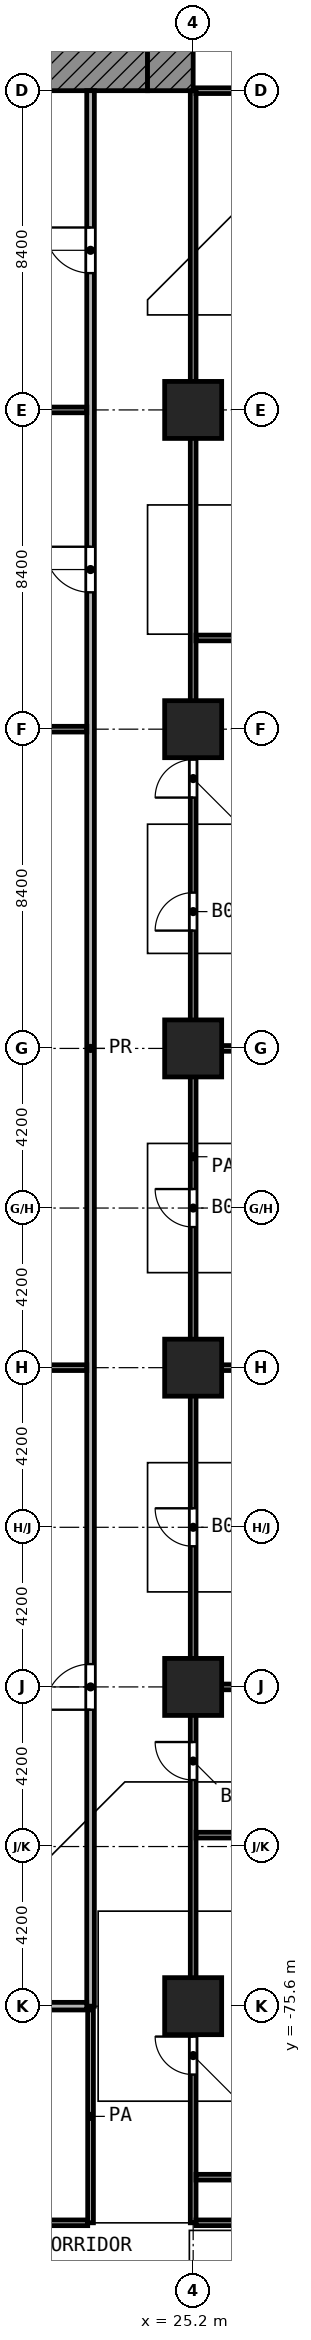
"""IFC4 building model, lengths in metres.
Left out: names, types, materials, properties, quantities, classifications, styles, units other than length and angle.
Written with IfcOpenShell. Run it as: python <this file> out.ifc"""

import sys

from ifc_helpers import new_model, si_unit, direction, frame, frame_2d, origin, origin_2d, place, context, subcontext, project, spatial, rectangle, extrude, element, fill, save


model = new_model("IFC4")
c1 = context("Model", 3, precision=1e-05, world=origin(), true_north=direction((0.0, 1.0)))
c2 = subcontext(c1, "Body", "Model", "MODEL_VIEW")
j1 = project(units=[si_unit("LENGTHUNIT", "METRE"), si_unit("PLANEANGLEUNIT", "RADIAN")], contexts=[c1])
p1 = place(None, origin())
s1 = spatial("IfcSite", under=j1, at=p1, CompositionType="ELEMENT")
p2 = place(p1, origin())
s2 = spatial("IfcBuilding", under=s1, at=p2, CompositionType="ELEMENT")
p3 = place(p2, frame((0.0, 0.0, -6.0)))
s3 = spatial("IfcBuildingStorey", under=s2, at=p3, CompositionType="ELEMENT", Elevation=-6.0)
for number, where, z_axis, x_axis in (
    (1, (25.2, -33.6, 0.0), (0.0, 0.0, 1.0), (1.0, 0.0, 0.0)),
    (2, (25.2, -42.0, 0.0), (0.0, 0.0, 1.0), (1.0, 0.0, 0.0)),
    (3, (25.2, -50.4, 0.0), (0.0, 0.0, 1.0), (1.0, 0.0, 0.0)),
    (4, (25.2, -58.8, 0.0), (0.0, 0.0, 1.0), (1.0, 0.0, 0.0)),
    (5, (25.2, -67.2, 0.0), (0.0, 0.0, 1.0), (1.0, 0.0, 0.0)),
    (6, (25.2, -75.6, 0.0), (0.0, 0.0, 1.0), (1.0, 0.0, 0.0)),
):
    element("IfcColumn", number, at=place(p3, frame(where, z_axis=z_axis, x_axis=x_axis)), inside=s3, PredefinedType="COLUMN", context=c2, shape_type="SweptSolid", body=[
        extrude(rectangle(XDim=1.5, YDim=1.5, at=origin_2d()), origin(), (0.0, 0.0, 1.0), 6.0),
    ])
p4 = place(p3, frame((5.4, -24.6, 0.0), z_axis=(0.0, 0.0, 1.0), x_axis=(1.0, 0.0, 0.0)))
e7 = element("IfcWall", 7, at=p4, inside=s3, PredefinedType="SHEAR", context=c2, shape_type="SweptSolid", body=[
    extrude(rectangle(XDim=18.6, YDim=1.2, at=frame_2d((9.3, 0.0))), origin(), (0.0, 0.0, 1.0), 5.55),
])
p5 = place(p4, frame((6.3, 0.0, 0.0)))
e8 = element("IfcOpeningElement", 8, at=p5, cuts=e7, PredefinedType="OPENING", context=c2, shape_type="SweptSolid", body=[
    extrude(rectangle(XDim=1.8, YDim=2.1, at=frame_2d((0.9, 1.05))), frame((0.0, 0.61, 0.0), z_axis=(0.0, -1.0, 0.0), x_axis=(1.0, 0.0, 0.0)), (0.0, 0.0, 1.0), 1.22),
])
p6 = place(p3, frame((24.6, -25.2, 0.0), z_axis=(0.0, 0.0, 1.0), x_axis=(0.0, 1.0, 0.0)))
e9 = element("IfcWall", 9, at=p6, inside=s3, PredefinedType="SHEAR", context=c2, shape_type="SweptSolid", body=[
    extrude(rectangle(XDim=1.2, YDim=1.2, at=frame_2d((0.6, 0.0))), origin(), (0.0, 0.0, 1.0), 5.55),
])
p7 = place(p3, frame((11.175, -81.3, 0.0), z_axis=(0.0, 0.0, 1.0), x_axis=(1.0, 0.0, 0.0)))
e10 = element("IfcWall", 10, at=p7, inside=s3, PredefinedType="PARTITIONING", context=c2, shape_type="SweptSolid", body=[
    extrude(rectangle(XDim=11.25, YDim=0.15, at=frame_2d((5.625, 0.0))), origin(), (0.0, 0.0, 1.0), 5.55),
])
p8 = place(p7, frame((5.125, 0.0, 0.0)))
e11 = element("IfcOpeningElement", 11, at=p8, cuts=e10, PredefinedType="OPENING", context=c2, shape_type="SweptSolid", body=[
    extrude(rectangle(XDim=1.0, YDim=2.1, at=frame_2d((0.5, 1.05))), frame((0.0, 0.085, 0.0), z_axis=(0.0, -1.0, 0.0), x_axis=(1.0, 0.0, 0.0)), (0.0, 0.0, 1.0), 0.17),
])
p9 = place(p3, frame((25.275, -81.3, 0.0), z_axis=(0.0, 0.0, 1.0), x_axis=(1.0, 0.0, 0.0)))
e12 = element("IfcWall", 12, at=p9, inside=s3, PredefinedType="PARTITIONING", context=c2, shape_type="SweptSolid", body=[
    extrude(rectangle(XDim=3.15, YDim=0.15, at=frame_2d((1.575, 0.0))), origin(), (0.0, 0.0, 1.0), 5.55),
])
p10 = place(p3, frame((25.275, -80.1, 0.0), z_axis=(0.0, 0.0, 1.0), x_axis=(1.0, 0.0, 0.0)))
e13 = element("IfcWall", 13, at=p10, inside=s3, PredefinedType="PARTITIONING", context=c2, shape_type="SweptSolid", body=[
    extrude(rectangle(XDim=5.838, YDim=0.15, at=frame_2d((2.919, 0.0))), origin(), (0.0, 0.0, 1.0), 5.55),
])
p11 = place(p3, frame((25.275, -71.1, 0.0), z_axis=(0.0, 0.0, 1.0), x_axis=(1.0, 0.0, 0.0)))
e14 = element("IfcWall", 14, at=p11, inside=s3, PredefinedType="PARTITIONING", context=c2, shape_type="SweptSolid", body=[
    extrude(rectangle(XDim=8.051, YDim=0.15, at=frame_2d((4.025, 0.0))), origin(), (0.0, 0.0, 1.0), 5.55),
])
p12 = place(p3, frame((25.275, -67.2, 0.0), z_axis=(0.0, 0.0, 1.0), x_axis=(1.0, 0.0, 0.0)))
e15 = element("IfcWall", 15, at=p12, inside=s3, PredefinedType="PARTITIONING", context=c2, shape_type="SweptSolid", body=[
    extrude(rectangle(XDim=8.245, YDim=0.15, at=frame_2d((4.123, 0.0))), origin(), (0.0, 0.0, 1.0), 5.55),
])
p13 = place(p3, frame((11.2, -58.8, 0.0), z_axis=(0.0, 0.0, 1.0), x_axis=(1.0, 0.0, 0.0)))
e16 = element("IfcWall", 16, at=p13, inside=s3, PredefinedType="PARTITIONING", context=c2, shape_type="SweptSolid", body=[
    extrude(rectangle(XDim=11.2, YDim=0.15, at=frame_2d((5.6, 0.0))), origin(), (0.0, 0.0, 1.0), 5.55),
])
for number, where, z_axis, x_axis in (
    (17, (25.275, -58.8, 0.0), (0.0, 0.0, 1.0), (1.0, 0.0, 0.0)),
    (18, (25.275, -50.4, 0.0), (0.0, 0.0, 1.0), (1.0, 0.0, 0.0)),
):
    element("IfcWall", number, at=place(p3, frame(where, z_axis=z_axis, x_axis=x_axis)), inside=s3, PredefinedType="PARTITIONING", context=c2, shape_type="SweptSolid", body=[
        extrude(rectangle(XDim=8.245, YDim=0.15, at=frame_2d((4.123, 0.0))), origin(), (0.0, 0.0, 1.0), 5.55),
    ])
p14 = place(p3, frame((11.2, -42.0, 0.0), z_axis=(0.0, 0.0, 1.0), x_axis=(1.0, 0.0, 0.0)))
e19 = element("IfcWall", 19, at=p14, inside=s3, PredefinedType="PARTITIONING", context=c2, shape_type="SweptSolid", body=[
    extrude(rectangle(XDim=11.2, YDim=0.15, at=frame_2d((5.6, 0.0))), origin(), (0.0, 0.0, 1.0), 5.55),
])
p15 = place(p3, frame((25.275, -39.6, 0.0), z_axis=(0.0, 0.0, 1.0), x_axis=(1.0, 0.0, 0.0)))
e20 = element("IfcWall", 20, at=p15, inside=s3, PredefinedType="PARTITIONING", context=c2, shape_type="SweptSolid", body=[
    extrude(rectangle(XDim=8.245, YDim=0.15, at=frame_2d((4.123, 0.0))), origin(), (0.0, 0.0, 1.0), 5.55),
])
p16 = place(p3, frame((11.2, -33.6, 0.0), z_axis=(0.0, 0.0, 1.0), x_axis=(1.0, 0.0, 0.0)))
e21 = element("IfcWall", 21, at=p16, inside=s3, PredefinedType="PARTITIONING", context=c2, shape_type="SweptSolid", body=[
    extrude(rectangle(XDim=11.2, YDim=0.15, at=frame_2d((5.6, 0.0))), origin(), (0.0, 0.0, 1.0), 5.55),
])
p17 = place(p3, frame((25.275, -25.2, 0.0), z_axis=(0.0, 0.0, 1.0), x_axis=(1.0, 0.0, 0.0)))
e22 = element("IfcWall", 22, at=p17, inside=s3, PredefinedType="PARTITIONING", context=c2, shape_type="SweptSolid", body=[
    extrude(rectangle(XDim=32.025, YDim=0.15, at=frame_2d((16.013, 0.0))), origin(), (0.0, 0.0, 1.0), 5.55),
])
p18 = place(p17, frame((17.525, 0.0, 0.0)))
e23 = element("IfcOpeningElement", 23, at=p18, cuts=e22, PredefinedType="OPENING", context=c2, shape_type="SweptSolid", body=[
    extrude(rectangle(XDim=1.0, YDim=2.1, at=frame_2d((0.5, 1.05))), frame((0.0, 0.085, 0.0), z_axis=(0.0, -1.0, 0.0), x_axis=(1.0, 0.0, 0.0)), (0.0, 0.0, 1.0), 0.17),
])
p19 = place(p17, frame((6.525, 0.0, 0.0)))
e24 = element("IfcOpeningElement", 24, at=p19, cuts=e22, PredefinedType="OPENING", context=c2, shape_type="SweptSolid", body=[
    extrude(rectangle(XDim=1.0, YDim=2.1, at=frame_2d((0.5, 1.05))), frame((0.0, 0.085, 0.0), z_axis=(0.0, -1.0, 0.0), x_axis=(1.0, 0.0, 0.0)), (0.0, 0.0, 1.0), 0.17),
])
p20 = place(p17, frame((29.225, 0.0, 0.0)))
e25 = element("IfcOpeningElement", 25, at=p20, cuts=e22, PredefinedType="OPENING", context=c2, shape_type="SweptSolid", body=[
    extrude(rectangle(XDim=1.0, YDim=2.1, at=frame_2d((0.5, 1.05))), frame((0.0, 0.085, 0.0), z_axis=(0.0, -1.0, 0.0), x_axis=(1.0, 0.0, 0.0)), (0.0, 0.0, 1.0), 0.17),
])
p21 = place(p17, frame((26.925, 0.0, 0.0)))
e26 = element("IfcOpeningElement", 26, at=p21, cuts=e22, PredefinedType="OPENING", context=c2, shape_type="SweptSolid", body=[
    extrude(rectangle(XDim=1.0, YDim=2.1, at=frame_2d((0.5, 1.05))), frame((0.0, 0.085, 0.0), z_axis=(0.0, -1.0, 0.0), x_axis=(1.0, 0.0, 0.0)), (0.0, 0.0, 1.0), 0.17),
])
p22 = place(p3, frame((22.5, -81.3, 0.0), z_axis=(0.0, 0.0, 1.0), x_axis=(0.0, 1.0, 0.0)))
e27 = element("IfcWall", 27, at=p22, inside=s3, PredefinedType="PARTITIONING", context=c2, shape_type="SweptSolid", body=[
    extrude(rectangle(XDim=5.6, YDim=0.15, at=frame_2d((2.8, 0.0))), origin(), (0.0, 0.0, 1.0), 5.55),
])
p23 = place(p3, frame((25.2, -81.3, 0.0), z_axis=(0.0, 0.0, 1.0), x_axis=(0.0, 1.0, 0.0)))
e28 = element("IfcWall", 28, at=p23, inside=s3, PredefinedType="PARTITIONING", context=c2, shape_type="SweptSolid", body=[
    extrude(rectangle(XDim=56.1, YDim=0.15, at=frame_2d((28.05, 0.0))), origin(), (0.0, 0.0, 1.0), 5.55),
])
p24 = place(p23, frame((37.5, 0.0, 0.0)))
e29 = element("IfcOpeningElement", 29, at=p24, cuts=e28, PredefinedType="OPENING", context=c2, shape_type="SweptSolid", body=[
    extrude(rectangle(XDim=1.0, YDim=2.1, at=frame_2d((0.5, 1.05))), frame((0.0, 0.085, 0.0), z_axis=(0.0, -1.0, 0.0), x_axis=(1.0, 0.0, 0.0)), (0.0, 0.0, 1.0), 0.17),
])
p25 = place(p23, frame((34.0, 0.0, 0.0)))
e30 = element("IfcOpeningElement", 30, at=p25, cuts=e28, PredefinedType="OPENING", context=c2, shape_type="SweptSolid", body=[
    extrude(rectangle(XDim=1.0, YDim=2.1, at=frame_2d((0.5, 1.05))), frame((0.0, 0.085, 0.0), z_axis=(0.0, -1.0, 0.0), x_axis=(1.0, 0.0, 0.0)), (0.0, 0.0, 1.0), 0.17),
])
p26 = place(p23, frame((26.2, 0.0, 0.0)))
e31 = element("IfcOpeningElement", 31, at=p26, cuts=e28, PredefinedType="OPENING", context=c2, shape_type="SweptSolid", body=[
    extrude(rectangle(XDim=1.0, YDim=2.1, at=frame_2d((0.5, 1.05))), frame((0.0, 0.085, 0.0), z_axis=(0.0, -1.0, 0.0), x_axis=(1.0, 0.0, 0.0)), (0.0, 0.0, 1.0), 0.17),
])
p27 = place(p23, frame((17.8, 0.0, 0.0)))
e32 = element("IfcOpeningElement", 32, at=p27, cuts=e28, PredefinedType="OPENING", context=c2, shape_type="SweptSolid", body=[
    extrude(rectangle(XDim=1.0, YDim=2.1, at=frame_2d((0.5, 1.05))), frame((0.0, 0.085, 0.0), z_axis=(0.0, -1.0, 0.0), x_axis=(1.0, 0.0, 0.0)), (0.0, 0.0, 1.0), 0.17),
])
p28 = place(p23, frame((11.65, 0.0, 0.0)))
e33 = element("IfcOpeningElement", 33, at=p28, cuts=e28, PredefinedType="OPENING", context=c2, shape_type="SweptSolid", body=[
    extrude(rectangle(XDim=1.0, YDim=2.1, at=frame_2d((0.5, 1.05))), frame((0.0, 0.085, 0.0), z_axis=(0.0, -1.0, 0.0), x_axis=(1.0, 0.0, 0.0)), (0.0, 0.0, 1.0), 0.17),
])
p29 = place(p23, frame((3.9, 0.0, 0.0)))
e34 = element("IfcOpeningElement", 34, at=p29, cuts=e28, PredefinedType="OPENING", context=c2, shape_type="SweptSolid", body=[
    extrude(rectangle(XDim=1.0, YDim=2.1, at=frame_2d((0.5, 1.05))), frame((0.0, 0.085, 0.0), z_axis=(0.0, -1.0, 0.0), x_axis=(1.0, 0.0, 0.0)), (0.0, 0.0, 1.0), 0.17),
])
p30 = place(p3, frame((11.2, -75.6, 0.0), z_axis=(0.0, 0.0, 1.0), x_axis=(1.0, 0.0, 0.0)))
e35 = element("IfcWall", 35, at=p30, inside=s3, PredefinedType="PARTITIONING", context=c2, shape_type="SweptSolid", body=[
    extrude(rectangle(XDim=11.2, YDim=0.2, at=frame_2d((5.6, 0.0))), origin(), (0.0, 0.0, 1.0), 5.55),
])
p31 = place(p3, frame((22.5, -75.6, 0.0), z_axis=(0.0, 0.0, 1.0), x_axis=(0.0, 1.0, 0.0)))
e36 = element("IfcWall", 36, at=p31, inside=s3, PredefinedType="PARTITIONING", context=c2, shape_type="SweptSolid", body=[
    extrude(rectangle(XDim=50.4, YDim=0.2, at=frame_2d((25.2, 0.0))), origin(), (0.0, 0.0, 1.0), 5.55),
])
p32 = place(p31, frame((45.6, 0.0, 0.0)))
e37 = element("IfcOpeningElement", 37, at=p32, cuts=e36, PredefinedType="OPENING", context=c2, shape_type="SweptSolid", body=[
    extrude(rectangle(XDim=1.2, YDim=2.1, at=frame_2d((0.6, 1.05))), frame((0.0, 0.11, 0.0), z_axis=(0.0, -1.0, 0.0), x_axis=(1.0, 0.0, 0.0)), (0.0, 0.0, 1.0), 0.22),
])
p33 = place(p31, frame((37.2, 0.0, 0.0)))
e38 = element("IfcOpeningElement", 38, at=p33, cuts=e36, PredefinedType="OPENING", context=c2, shape_type="SweptSolid", body=[
    extrude(rectangle(XDim=1.2, YDim=2.1, at=frame_2d((0.6, 1.05))), frame((0.0, 0.11, 0.0), z_axis=(0.0, -1.0, 0.0), x_axis=(1.0, 0.0, 0.0)), (0.0, 0.0, 1.0), 0.22),
])
p34 = place(p31, frame((7.8, 0.0, 0.0)))
e39 = element("IfcOpeningElement", 39, at=p34, cuts=e36, PredefinedType="OPENING", context=c2, shape_type="SweptSolid", body=[
    extrude(rectangle(XDim=1.2, YDim=2.1, at=frame_2d((0.6, 1.05))), frame((0.0, 0.11, 0.0), z_axis=(0.0, -1.0, 0.0), x_axis=(1.0, 0.0, 0.0)), (0.0, 0.0, 1.0), 0.22),
])
p35 = place(p32, origin())
e40 = element("IfcDoor", 40, at=p35, inside=s3, OperationType="SINGLE_SWING_RIGHT", PredefinedType="DOOR", context=c2, shape_type="SweptSolid", body=[
    extrude(rectangle(XDim=1.2, YDim=2.1, at=frame_2d((0.6, 1.05))), frame((0.0, 0.025, 0.0), z_axis=(0.0, -1.0, 0.0), x_axis=(1.0, 0.0, 0.0)), (0.0, 0.0, 1.0), 0.05),
])
fill(e37, e40)
p36 = place(p33, origin())
e41 = element("IfcDoor", 41, at=p36, inside=s3, OperationType="SINGLE_SWING_RIGHT", PredefinedType="DOOR", context=c2, shape_type="SweptSolid", body=[
    extrude(rectangle(XDim=1.2, YDim=2.1, at=frame_2d((0.6, 1.05))), frame((0.0, 0.025, 0.0), z_axis=(0.0, -1.0, 0.0), x_axis=(1.0, 0.0, 0.0)), (0.0, 0.0, 1.0), 0.05),
])
fill(e38, e41)
p37 = place(p34, origin())
e42 = element("IfcDoor", 42, at=p37, inside=s3, OperationType="SINGLE_SWING_LEFT", PredefinedType="DOOR", context=c2, shape_type="SweptSolid", body=[
    extrude(rectangle(XDim=1.2, YDim=2.1, at=frame_2d((0.6, 1.05))), frame((0.0, 0.025, 0.0), z_axis=(0.0, -1.0, 0.0), x_axis=(1.0, 0.0, 0.0)), (0.0, 0.0, 1.0), 0.05),
])
fill(e39, e42)
p38 = place(p24, origin())
e43 = element("IfcDoor", 43, at=p38, inside=s3, OperationType="SINGLE_SWING_LEFT", PredefinedType="DOOR", context=c2, shape_type="SweptSolid", body=[
    extrude(rectangle(XDim=1.0, YDim=2.1, at=frame_2d((0.5, 1.05))), frame((0.0, 0.025, 0.0), z_axis=(0.0, -1.0, 0.0), x_axis=(1.0, 0.0, 0.0)), (0.0, 0.0, 1.0), 0.05),
])
fill(e29, e43)
p39 = place(p25, origin())
e44 = element("IfcDoor", 44, at=p39, inside=s3, OperationType="SINGLE_SWING_LEFT", PredefinedType="DOOR", context=c2, shape_type="SweptSolid", body=[
    extrude(rectangle(XDim=1.0, YDim=2.1, at=frame_2d((0.5, 1.05))), frame((0.0, 0.025, 0.0), z_axis=(0.0, -1.0, 0.0), x_axis=(1.0, 0.0, 0.0)), (0.0, 0.0, 1.0), 0.05),
])
fill(e30, e44)
p40 = place(p26, origin())
e45 = element("IfcDoor", 45, at=p40, inside=s3, OperationType="SINGLE_SWING_RIGHT", PredefinedType="DOOR", context=c2, shape_type="SweptSolid", body=[
    extrude(rectangle(XDim=1.0, YDim=2.1, at=frame_2d((0.5, 1.05))), frame((0.0, 0.025, 0.0), z_axis=(0.0, -1.0, 0.0), x_axis=(1.0, 0.0, 0.0)), (0.0, 0.0, 1.0), 0.05),
])
fill(e31, e45)
p41 = place(p27, origin())
e46 = element("IfcDoor", 46, at=p41, inside=s3, OperationType="SINGLE_SWING_RIGHT", PredefinedType="DOOR", context=c2, shape_type="SweptSolid", body=[
    extrude(rectangle(XDim=1.0, YDim=2.1, at=frame_2d((0.5, 1.05))), frame((0.0, 0.025, 0.0), z_axis=(0.0, -1.0, 0.0), x_axis=(1.0, 0.0, 0.0)), (0.0, 0.0, 1.0), 0.05),
])
fill(e32, e46)
p42 = place(p28, origin())
e47 = element("IfcDoor", 47, at=p42, inside=s3, OperationType="SINGLE_SWING_RIGHT", PredefinedType="DOOR", context=c2, shape_type="SweptSolid", body=[
    extrude(rectangle(XDim=1.0, YDim=2.1, at=frame_2d((0.5, 1.05))), frame((0.0, 0.025, 0.0), z_axis=(0.0, -1.0, 0.0), x_axis=(1.0, 0.0, 0.0)), (0.0, 0.0, 1.0), 0.05),
])
fill(e33, e47)
p43 = place(p29, origin())
e48 = element("IfcDoor", 48, at=p43, inside=s3, OperationType="SINGLE_SWING_RIGHT", PredefinedType="DOOR", context=c2, shape_type="SweptSolid", body=[
    extrude(rectangle(XDim=1.0, YDim=2.1, at=frame_2d((0.5, 1.05))), frame((0.0, 0.025, 0.0), z_axis=(0.0, -1.0, 0.0), x_axis=(1.0, 0.0, 0.0)), (0.0, 0.0, 1.0), 0.05),
])
fill(e34, e48)
save(model, sys.argv[1])
